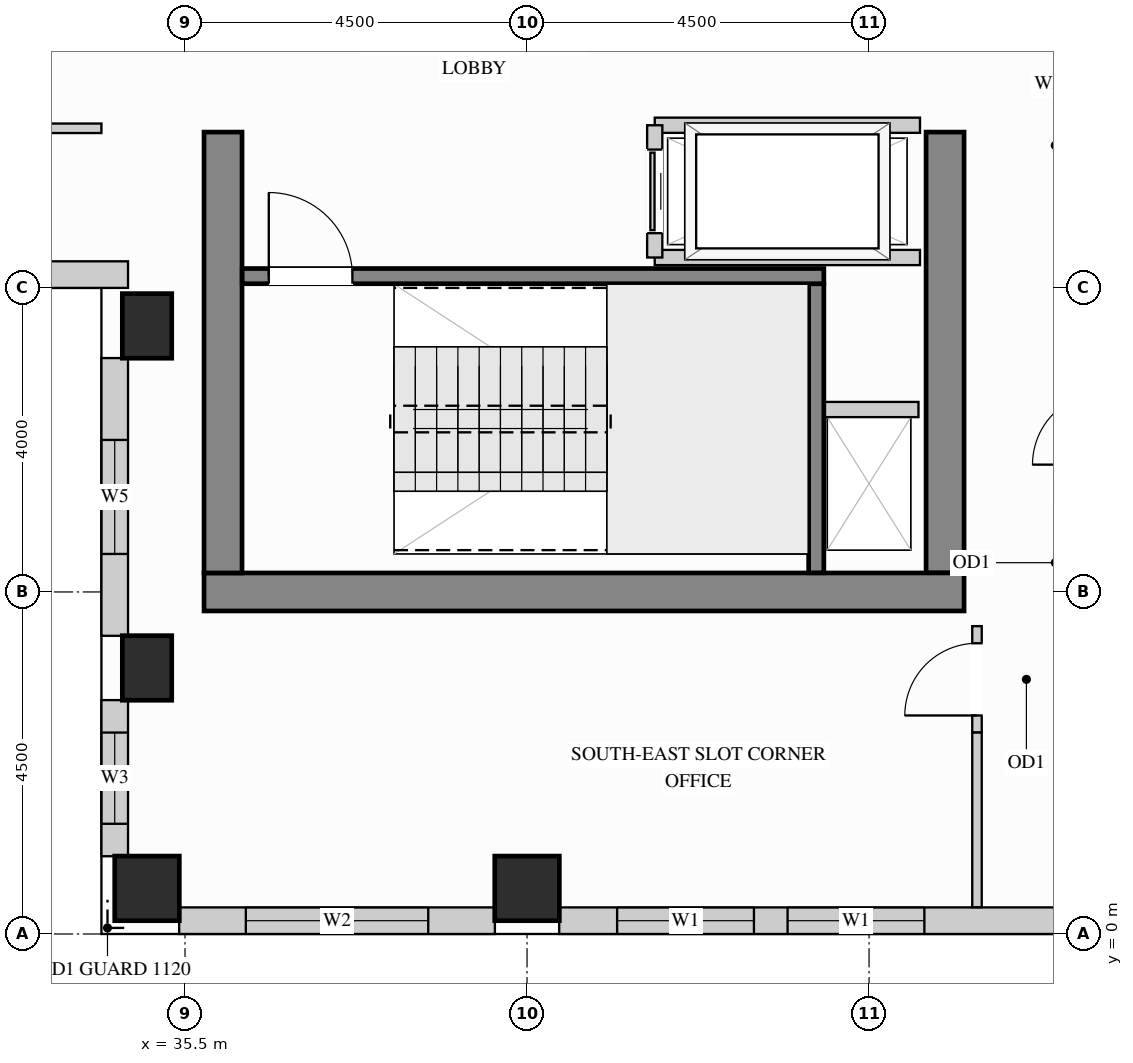
"""IFC4 building model, lengths in metres.
Left out: names, types, materials, properties, quantities, classifications, styles, units other than length and angle.
Written with IfcOpenShell. Run it as: python <this file> out.ifc"""

import sys

from ifc_helpers import new_model, si_unit, direction, frame, frame_2d, origin, origin_2d, place, context, subcontext, project, spatial, rectangle, extrude, source, transform, mapped, element, fill, save


model = new_model("IFC4")
c1 = context("Model", 3, precision=1e-05, world=origin(), true_north=direction((0.0, 1.0)))
c2 = subcontext(c1, "Body", "Model", "MODEL_VIEW")
j1 = project(units=[si_unit("LENGTHUNIT", "METRE"), si_unit("PLANEANGLEUNIT", "RADIAN")], contexts=[c1])
p1 = place(None, origin())
s1 = spatial("IfcSite", under=j1, at=p1, CompositionType="ELEMENT")
p2 = place(p1, origin())
s2 = spatial("IfcBuilding", under=s1, at=p2, CompositionType="ELEMENT")
p3 = place(p2, frame((0.0, 0.0, 223.2)))
s3 = spatial("IfcBuildingStorey", under=s2, at=p3, CompositionType="ELEMENT", Elevation=223.2)
m1 = source(origin(), c2, "Body", "SweptSolid", [
    extrude(rectangle(XDim=0.65, YDim=0.85, at=origin_2d()), origin(), (0.0, 0.0, 1.0), 3.4),
])
for number, where, z_axis, x_axis in (
    (1, (35.0, 3.5, 0.0), (0.0, 0.0, 1.0), (1.0, 0.0, 0.0)),
    (2, (35.0, 8.0, 0.0), (0.0, 0.0, 1.0), (1.0, 0.0, 0.0)),
):
    element("IfcColumn", number, at=place(p3, frame(where, z_axis=z_axis, x_axis=x_axis)), inside=s3, PredefinedType="COLUMN", context=c2, shape_type="MappedRepresentation", body=[
        mapped(m1, transform((0.0, 0.0, 0.0), x_axis=(1.0, 0.0, 0.0), y_axis=(0.0, 1.0, 0.0), z_axis=(0.0, 0.0, 1.0))),
    ])
m2 = source(origin(), c2, "Body", "SweptSolid", [
    extrude(rectangle(XDim=0.85, YDim=0.85, at=origin_2d()), origin(), (0.0, 0.0, 1.0), 3.4),
])
for number, where, z_axis, x_axis in (
    (3, (35.0, 0.6, 0.0), (0.0, 0.0, 1.0), (1.0, 0.0, 0.0)),
    (4, (40.0, 0.6, 0.0), (0.0, 0.0, 1.0), (1.0, 0.0, 0.0)),
):
    element("IfcColumn", number, at=place(p3, frame(where, z_axis=z_axis, x_axis=x_axis)), inside=s3, PredefinedType="COLUMN", context=c2, shape_type="MappedRepresentation", body=[
        mapped(m2, transform((0.0, 0.0, 0.0), x_axis=(1.0, 0.0, 0.0), y_axis=(0.0, 1.0, 0.0), z_axis=(0.0, 0.0, 1.0))),
    ])
m3 = source(origin(), c2, "Body", "SweptSolid", [
    extrude(rectangle(XDim=5.8, YDim=0.5, at=frame_2d((2.9, 0.0))), origin(), (0.0, 0.0, 1.0), 3.4),
])
p4 = place(p3, frame((45.5, 4.75, 0.0), z_axis=(0.0, 0.0, 1.0), x_axis=(0.0, 1.0, 0.0)))
e5 = element("IfcWall", 5, at=p4, inside=s3, PredefinedType="SHEAR", context=c2, shape_type="MappedRepresentation", body=[
    mapped(m3, transform((0.0, 0.0, 0.0), x_axis=(1.0, 0.0, 0.0), y_axis=(0.0, 1.0, 0.0), z_axis=(0.0, 0.0, 1.0))),
])
m4 = source(origin(), c2, "Body", "SweptSolid", [
    extrude(rectangle(XDim=10.0, YDim=0.5, at=frame_2d((5.0, 0.0))), origin(), (0.0, 0.0, 1.0), 3.4),
])
p5 = place(p3, frame((35.75, 4.5, 0.0), z_axis=(0.0, 0.0, 1.0), x_axis=(1.0, 0.0, 0.0)))
e6 = element("IfcWall", 6, at=p5, inside=s3, PredefinedType="SHEAR", context=c2, shape_type="MappedRepresentation", body=[
    mapped(m4, transform((0.0, 0.0, 0.0), x_axis=(1.0, 0.0, 0.0), y_axis=(0.0, 1.0, 0.0), z_axis=(0.0, 0.0, 1.0))),
])
p6 = place(p3, frame((36.0, 4.75, 0.0), z_axis=(0.0, 0.0, 1.0), x_axis=(0.0, 1.0, 0.0)))
e7 = element("IfcWall", 7, at=p6, inside=s3, PredefinedType="SHEAR", context=c2, shape_type="MappedRepresentation", body=[
    mapped(m3, transform((0.0, 0.0, 0.0), x_axis=(1.0, 0.0, 0.0), y_axis=(0.0, 1.0, 0.0), z_axis=(0.0, 0.0, 1.0))),
])
p7 = place(p3, frame((19.323, 8.675, 0.0), z_axis=(0.0, 0.0, 1.0), x_axis=(1.0, 0.0, 0.0)))
e8 = element("IfcWall", 8, at=p7, inside=s3, PredefinedType="SOLIDWALL", context=c2, shape_type="SweptSolid", body=[
    extrude(rectangle(XDim=15.427, YDim=0.35, at=frame_2d((7.713, 0.0))), origin(), (0.0, 0.0, 1.0), 3.385),
])
p8 = place(p7, frame((4.249, 0.0, 0.78)))
e9 = element("IfcOpeningElement", 9, at=p8, cuts=e8, PredefinedType="OPENING", context=c2, shape_type="SweptSolid", body=[
    extrude(rectangle(XDim=1.5, YDim=2.0, at=frame_2d((0.75, 1.0))), frame((0.0, 0.185, 0.0), z_axis=(0.0, -1.0, 0.0), x_axis=(1.0, 0.0, 0.0)), (0.0, 0.0, 1.0), 0.37),
])
p9 = place(p7, frame((9.678, 0.0, 0.78)))
e10 = element("IfcOpeningElement", 10, at=p9, cuts=e8, PredefinedType="OPENING", context=c2, shape_type="SweptSolid", body=[
    extrude(rectangle(XDim=1.5, YDim=2.0, at=frame_2d((0.75, 1.0))), frame((0.0, 0.185, 0.0), z_axis=(0.0, -1.0, 0.0), x_axis=(1.0, 0.0, 0.0)), (0.0, 0.0, 1.0), 0.37),
])
p10 = place(p3, frame((34.575, 7.577, 0.0), z_axis=(0.0, 0.0, 1.0), x_axis=(0.0, -1.0, 0.0)))
e11 = element("IfcWall", 11, at=p10, inside=s3, PredefinedType="SOLIDWALL", context=c2, shape_type="SweptSolid", body=[
    extrude(rectangle(XDim=3.654, YDim=0.35, at=frame_2d((1.827, 0.0))), origin(), (0.0, 0.0, 1.0), 3.385),
])
p11 = place(p10, frame((1.077, 0.0, 0.78)))
e12 = element("IfcOpeningElement", 12, at=p11, cuts=e11, PredefinedType="OPENING", context=c2, shape_type="SweptSolid", body=[
    extrude(rectangle(XDim=1.5, YDim=2.0, at=frame_2d((0.75, 1.0))), frame((0.0, 0.185, 0.0), z_axis=(0.0, -1.0, 0.0), x_axis=(1.0, 0.0, 0.0)), (0.0, 0.0, 1.0), 0.37),
])
p12 = place(p3, frame((34.575, 3.077, 0.0), z_axis=(0.0, 0.0, 1.0), x_axis=(0.0, -1.0, 0.0)))
e13 = element("IfcWall", 13, at=p12, inside=s3, PredefinedType="SOLIDWALL", context=c2, shape_type="SweptSolid", body=[
    extrude(rectangle(XDim=2.054, YDim=0.35, at=frame_2d((1.027, 0.0))), origin(), (0.0, 0.0, 1.0), 3.385),
])
p13 = place(p12, frame((0.427, 0.0, 0.78)))
e14 = element("IfcOpeningElement", 14, at=p13, cuts=e13, PredefinedType="OPENING", context=c2, shape_type="SweptSolid", body=[
    extrude(rectangle(XDim=1.2, YDim=2.0, at=frame_2d((0.6, 1.0))), frame((0.0, 0.185, 0.0), z_axis=(0.0, -1.0, 0.0), x_axis=(1.0, 0.0, 0.0)), (0.0, 0.0, 1.0), 0.37),
])
p14 = place(p3, frame((35.423, 0.175, 0.0), z_axis=(0.0, 0.0, 1.0), x_axis=(1.0, 0.0, 0.0)))
e15 = element("IfcWall", 15, at=p14, inside=s3, PredefinedType="SOLIDWALL", context=c2, shape_type="SweptSolid", body=[
    extrude(rectangle(XDim=4.154, YDim=0.35, at=frame_2d((2.077, 0.0))), origin(), (0.0, 0.0, 1.0), 3.385),
])
p15 = place(p14, frame((0.877, 0.0, 0.78)))
e16 = element("IfcOpeningElement", 16, at=p15, cuts=e15, PredefinedType="OPENING", context=c2, shape_type="SweptSolid", body=[
    extrude(rectangle(XDim=2.4, YDim=2.1, at=frame_2d((1.2, 1.05))), frame((0.0, 0.185, 0.0), z_axis=(0.0, -1.0, 0.0), x_axis=(1.0, 0.0, 0.0)), (0.0, 0.0, 1.0), 0.37),
])
p16 = place(p3, frame((40.423, 0.175, 0.0), z_axis=(0.0, 0.0, 1.0), x_axis=(1.0, 0.0, 0.0)))
e17 = element("IfcWall", 17, at=p16, inside=s3, PredefinedType="SOLIDWALL", context=c2, shape_type="SweptSolid", body=[
    extrude(rectangle(XDim=7.077, YDim=0.35, at=frame_2d((3.539, 0.0))), origin(), (0.0, 0.0, 1.0), 3.385),
])
p17 = place(p16, frame((0.762, 0.0, 0.78)))
e18 = element("IfcOpeningElement", 18, at=p17, cuts=e17, PredefinedType="OPENING", context=c2, shape_type="SweptSolid", body=[
    extrude(rectangle(XDim=1.8, YDim=2.1, at=frame_2d((0.9, 1.05))), frame((0.0, 0.185, 0.0), z_axis=(0.0, -1.0, 0.0), x_axis=(1.0, 0.0, 0.0)), (0.0, 0.0, 1.0), 0.37),
])
p18 = place(p16, frame((3.005, 0.0, 0.78)))
e19 = element("IfcOpeningElement", 19, at=p18, cuts=e17, PredefinedType="OPENING", context=c2, shape_type="SweptSolid", body=[
    extrude(rectangle(XDim=1.8, YDim=2.1, at=frame_2d((0.9, 1.05))), frame((0.0, 0.185, 0.0), z_axis=(0.0, -1.0, 0.0), x_axis=(1.0, 0.0, 0.0)), (0.0, 0.0, 1.0), 0.37),
])
p19 = place(p3, frame((45.92, 2.65, 0.0), z_axis=(0.0, 0.0, 1.0), x_axis=(0.0, 1.0, 0.0)))
e20 = element("IfcWall", 20, at=p19, inside=s3, PredefinedType="PARTITIONING", context=c2, shape_type="SweptSolid", body=[
    extrude(rectangle(XDim=1.4, YDim=0.125, at=frame_2d((0.7, 0.0))), origin(), (0.0, 0.0, 1.0), 3.385),
])
p20 = place(p19, frame((0.225, 0.0, 0.0)))
e21 = element("IfcOpeningElement", 21, at=p20, cuts=e20, PredefinedType="OPENING", context=c2, shape_type="SweptSolid", body=[
    extrude(rectangle(XDim=0.95, YDim=2.15, at=frame_2d((0.475, 1.075))), frame((0.0, 0.073, 0.0), z_axis=(0.0, -1.0, 0.0), x_axis=(1.0, 0.0, 0.0)), (0.0, 0.0, 1.0), 0.145),
])
m5 = source(origin(), c2, "Body", "SweptSolid", [
    extrude(rectangle(XDim=2.298, YDim=0.125, at=frame_2d((1.149, 0.0))), origin(), (0.0, 0.0, 1.0), 3.385),
])
p21 = place(p3, frame((45.92, 0.352, 0.0), z_axis=(0.0, 0.0, 1.0), x_axis=(0.0, 1.0, 0.0)))
e22 = element("IfcWall", 22, at=p21, inside=s3, PredefinedType="PARTITIONING", context=c2, shape_type="MappedRepresentation", body=[
    mapped(m5, transform((0.0, 0.0, 0.0), x_axis=(1.0, 0.0, 0.0), y_axis=(0.0, 1.0, 0.0), z_axis=(0.0, 0.0, 1.0))),
])
p22 = place(p3, frame((19.5, 10.6, 0.0), z_axis=(0.0, 0.0, 1.0), x_axis=(1.0, 0.0, 0.0)))
e23 = element("IfcWall", 23, at=p22, inside=s3, PredefinedType="PARTITIONING", context=c2, shape_type="SweptSolid", body=[
    extrude(rectangle(XDim=14.9, YDim=0.125, at=frame_2d((7.45, 0.0))), origin(), (0.0, 0.0, 1.0), 3.385),
])
p23 = place(p22, frame((6.975, 0.0, 0.0)))
e24 = element("IfcOpeningElement", 24, at=p23, cuts=e23, PredefinedType="OPENING", context=c2, shape_type="SweptSolid", body=[
    extrude(rectangle(XDim=0.95, YDim=2.15, at=frame_2d((0.475, 1.075))), frame((0.0, 0.073, 0.0), z_axis=(0.0, -1.0, 0.0), x_axis=(1.0, 0.0, 0.0)), (0.0, 0.0, 1.0), 0.145),
])
m6 = source(origin(), c2, "Body", "SweptSolid", [
    extrude(rectangle(XDim=1.3, YDim=0.2, at=frame_2d((0.65, 0.0))), origin(), (0.0, 0.0, 1.0), 3.385),
])
p24 = place(p3, frame((43.85, 6.9, 0.0), z_axis=(0.0, 0.0, 1.0), x_axis=(1.0, 0.0, 0.0)))
e25 = element("IfcWall", 25, at=p24, inside=s3, PredefinedType="PARTITIONING", context=c2, shape_type="MappedRepresentation", body=[
    mapped(m6, transform((0.0, 0.0, 0.0), x_axis=(1.0, 0.0, 0.0), y_axis=(0.0, 1.0, 0.0), z_axis=(0.0, 0.0, 1.0))),
])
m7 = source(origin(), c2, "Body", "SweptSolid", [
    extrude(rectangle(XDim=3.49, YDim=0.2, at=frame_2d((1.745, 0.0))), origin(), (0.0, 0.0, 1.0), 3.385),
])
for number, where, z_axis, x_axis in (
    (26, (41.68, 10.64, 0.0), (0.0, 0.0, 1.0), (1.0, 0.0, 0.0)),
    (27, (41.68, 8.9, 0.0), (0.0, 0.0, 1.0), (1.0, 0.0, 0.0)),
):
    element("IfcWall", number, at=place(p3, frame(where, z_axis=z_axis, x_axis=x_axis)), inside=s3, PredefinedType="PARTITIONING", context=c2, shape_type="MappedRepresentation", body=[
        mapped(m7, transform((0.0, 0.0, 0.0), x_axis=(1.0, 0.0, 0.0), y_axis=(0.0, 1.0, 0.0), z_axis=(0.0, 0.0, 1.0))),
    ])
p25 = place(p3, frame((41.68, 8.9, 0.0), z_axis=(0.0, 0.0, 1.0), x_axis=(0.0, 1.0, 0.0)))
e28 = element("IfcWall", 28, at=p25, inside=s3, PredefinedType="PARTITIONING", context=c2, shape_type="SweptSolid", body=[
    extrude(rectangle(XDim=1.74, YDim=0.2, at=frame_2d((0.87, 0.0))), origin(), (0.0, 0.0, 1.0), 3.385),
])
p26 = place(p25, frame((0.32, 0.0, 0.0)))
e29 = element("IfcOpeningElement", 29, at=p26, cuts=e28, PredefinedType="OPENING", context=c2, shape_type="SweptSolid", body=[
    extrude(rectangle(XDim=1.1, YDim=2.2, at=frame_2d((0.55, 1.1))), frame((0.0, 0.11, 0.0), z_axis=(0.0, -1.0, 0.0), x_axis=(1.0, 0.0, 0.0)), (0.0, 0.0, 1.0), 0.22),
])
m8 = source(origin(), c2, "Body", "SweptSolid", [
    extrude(rectangle(XDim=3.803, YDim=0.2, at=frame_2d((1.901, 0.0))), origin(), (0.0, 0.0, 1.0), 3.4),
])
p27 = place(p3, frame((43.805, 4.752, 0.0), z_axis=(0.0, 0.0, 1.0), x_axis=(0.0, 1.0, 0.0)))
e30 = element("IfcWall", 30, at=p27, inside=s3, PredefinedType="SHEAR", context=c2, shape_type="MappedRepresentation", body=[
    mapped(m8, transform((0.0, 0.0, 0.0), x_axis=(1.0, 0.0, 0.0), y_axis=(0.0, 1.0, 0.0), z_axis=(0.0, 0.0, 1.0))),
])
p28 = place(p3, frame((36.252, 8.655, 0.0), z_axis=(0.0, 0.0, 1.0), x_axis=(1.0, 0.0, 0.0)))
e31 = element("IfcWall", 31, at=p28, inside=s3, PredefinedType="SHEAR", context=c2, shape_type="SweptSolid", body=[
    extrude(rectangle(XDim=7.653, YDim=0.2, at=frame_2d((3.827, 0.0))), origin(), (0.0, 0.0, 1.0), 3.4),
])
p29 = place(p28, frame((0.35, 0.0, 0.0)))
e32 = element("IfcOpeningElement", 32, at=p29, cuts=e31, PredefinedType="OPENING", context=c2, shape_type="SweptSolid", body=[
    extrude(rectangle(XDim=1.1, YDim=2.15, at=frame_2d((0.55, 1.075))), frame((0.0, 0.11, 0.0), z_axis=(0.0, -1.0, 0.0), x_axis=(1.0, 0.0, 0.0)), (0.0, 0.0, 1.0), 0.22),
])
m9 = source(origin(), c2, "Body", "SweptSolid", [
    extrude(rectangle(XDim=1.1, YDim=2.2, at=frame_2d((0.55, 1.1))), frame((0.0, 0.025, 0.0), z_axis=(0.0, -1.0, 0.0), x_axis=(1.0, 0.0, 0.0)), (0.0, 0.0, 1.0), 0.05),
])
p30 = place(p26, origin())
e33 = element("IfcDoor", 33, at=p30, inside=s3, OperationType="SLIDING_TO_LEFT", PredefinedType="DOOR", context=c2, shape_type="MappedRepresentation", body=[
    mapped(m9, transform((0.0, 0.0, 0.0), x_axis=(1.0, 0.0, 0.0), y_axis=(0.0, 1.0, 0.0), z_axis=(0.0, 0.0, 1.0))),
])
fill(e29, e33)
m10 = source(origin(), c2, "Body", "SweptSolid", [
    extrude(rectangle(XDim=0.95, YDim=2.15, at=frame_2d((0.475, 1.075))), frame((0.0, 0.025, 0.0), z_axis=(0.0, -1.0, 0.0), x_axis=(1.0, 0.0, 0.0)), (0.0, 0.0, 1.0), 0.05),
])
p31 = place(p20, origin())
e34 = element("IfcDoor", 34, at=p31, inside=s3, OperationType="SINGLE_SWING_LEFT", PredefinedType="DOOR", context=c2, shape_type="MappedRepresentation", body=[
    mapped(m10, transform((0.0, 0.0, 0.0), x_axis=(1.0, 0.0, 0.0), y_axis=(0.0, 1.0, 0.0), z_axis=(0.0, 0.0, 1.0))),
])
fill(e21, e34)
m11 = source(origin(), c2, "Body", "SweptSolid", [
    extrude(rectangle(XDim=1.1, YDim=2.15, at=frame_2d((0.55, 1.075))), frame((0.0, 0.025, 0.0), z_axis=(0.0, -1.0, 0.0), x_axis=(1.0, 0.0, 0.0)), (0.0, 0.0, 1.0), 0.05),
])
p32 = place(p29, origin())
e35 = element("IfcDoor", 35, at=p32, inside=s3, OperationType="SINGLE_SWING_LEFT", PredefinedType="DOOR", context=c2, shape_type="MappedRepresentation", body=[
    mapped(m11, transform((0.0, 0.0, 0.0), x_axis=(1.0, 0.0, 0.0), y_axis=(0.0, 1.0, 0.0), z_axis=(0.0, 0.0, 1.0))),
])
fill(e32, e35)
m12 = source(origin(), c2, "Body", "SweptSolid", [
    extrude(rectangle(XDim=1.8, YDim=2.1, at=frame_2d((0.9, 1.05))), frame((0.0, 0.03, 0.0), z_axis=(0.0, -1.0, 0.0), x_axis=(1.0, 0.0, 0.0)), (0.0, 0.0, 1.0), 0.06),
])
p33 = place(p17, origin())
e36 = element("IfcWindow", 36, at=p33, inside=s3, PartitioningType="SINGLE_PANEL", PredefinedType="WINDOW", context=c2, shape_type="MappedRepresentation", body=[
    mapped(m12, transform((0.0, 0.0, 0.0), x_axis=(1.0, 0.0, 0.0), y_axis=(0.0, 1.0, 0.0), z_axis=(0.0, 0.0, 1.0))),
])
fill(e18, e36)
p34 = place(p18, origin())
e37 = element("IfcWindow", 37, at=p34, inside=s3, PartitioningType="SINGLE_PANEL", PredefinedType="WINDOW", context=c2, shape_type="MappedRepresentation", body=[
    mapped(m12, transform((0.0, 0.0, 0.0), x_axis=(1.0, 0.0, 0.0), y_axis=(0.0, 1.0, 0.0), z_axis=(0.0, 0.0, 1.0))),
])
fill(e19, e37)
m13 = source(origin(), c2, "Body", "SweptSolid", [
    extrude(rectangle(XDim=2.4, YDim=2.1, at=frame_2d((1.2, 1.05))), frame((0.0, 0.03, 0.0), z_axis=(0.0, -1.0, 0.0), x_axis=(1.0, 0.0, 0.0)), (0.0, 0.0, 1.0), 0.06),
])
p35 = place(p15, origin())
e38 = element("IfcWindow", 38, at=p35, inside=s3, PartitioningType="SINGLE_PANEL", PredefinedType="WINDOW", context=c2, shape_type="MappedRepresentation", body=[
    mapped(m13, transform((0.0, 0.0, 0.0), x_axis=(1.0, 0.0, 0.0), y_axis=(0.0, 1.0, 0.0), z_axis=(0.0, 0.0, 1.0))),
])
fill(e16, e38)
m14 = source(origin(), c2, "Body", "SweptSolid", [
    extrude(rectangle(XDim=1.2, YDim=2.0, at=frame_2d((0.6, 1.0))), frame((0.0, 0.03, 0.0), z_axis=(0.0, -1.0, 0.0), x_axis=(1.0, 0.0, 0.0)), (0.0, 0.0, 1.0), 0.06),
])
p36 = place(p13, origin())
e39 = element("IfcWindow", 39, at=p36, inside=s3, PartitioningType="SINGLE_PANEL", PredefinedType="WINDOW", context=c2, shape_type="MappedRepresentation", body=[
    mapped(m14, transform((0.0, 0.0, 0.0), x_axis=(1.0, 0.0, 0.0), y_axis=(0.0, 1.0, 0.0), z_axis=(0.0, 0.0, 1.0))),
])
fill(e14, e39)
m15 = source(origin(), c2, "Body", "SweptSolid", [
    extrude(rectangle(XDim=1.5, YDim=2.0, at=frame_2d((0.75, 1.0))), frame((0.0, 0.03, 0.0), z_axis=(0.0, -1.0, 0.0), x_axis=(1.0, 0.0, 0.0)), (0.0, 0.0, 1.0), 0.06),
])
p37 = place(p11, origin())
e40 = element("IfcWindow", 40, at=p37, inside=s3, PartitioningType="SINGLE_PANEL", PredefinedType="WINDOW", context=c2, shape_type="MappedRepresentation", body=[
    mapped(m15, transform((0.0, 0.0, 0.0), x_axis=(1.0, 0.0, 0.0), y_axis=(0.0, 1.0, 0.0), z_axis=(0.0, 0.0, 1.0))),
])
fill(e12, e40)
save(model, sys.argv[1])
